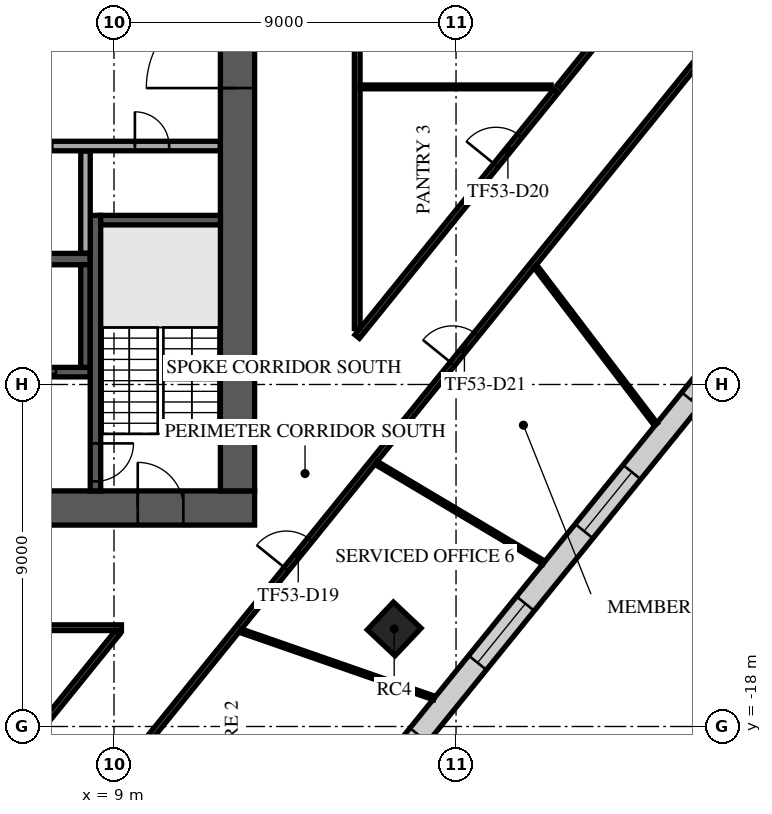
"""IFC4 building model, lengths in metres.
Left out: names, types, materials, properties, quantities, classifications, styles, units other than length and angle.
Written with IfcOpenShell. Run it as: python <this file> out.ifc"""

import sys

from ifc_helpers import new_model, si_unit, direction, frame, frame_2d, origin, origin_2d, place, context, subcontext, project, spatial, rectangle, extrude, element, fill, save


model = new_model("IFC4")
c1 = context("Model", 3, precision=1e-05, world=origin(), true_north=direction((0.0, 1.0)))
c2 = subcontext(c1, "Body", "Model", "MODEL_VIEW")
j1 = project(units=[si_unit("LENGTHUNIT", "METRE"), si_unit("PLANEANGLEUNIT", "RADIAN")], contexts=[c1])
p1 = place(None, origin())
s1 = spatial("IfcSite", under=j1, at=p1, CompositionType="ELEMENT")
p2 = place(p1, origin())
s2 = spatial("IfcBuilding", under=s1, at=p2, CompositionType="ELEMENT")
p3 = place(p2, frame((0.0, 0.0, 225.3)))
s3 = spatial("IfcBuildingStorey", under=s2, at=p3, CompositionType="ELEMENT", Elevation=225.3)
p4 = place(p3, frame((16.373, -15.433, 0.0), z_axis=(0.0, 0.0, 1.0), x_axis=(0.685916152371, 0.727680583715, 0.0)))
e1 = element("IfcColumn", 1, at=p4, inside=s3, PredefinedType="COLUMN", context=c2, shape_type="SweptSolid", body=[
    extrude(rectangle(XDim=1.0, YDim=1.0, at=origin_2d()), origin(), (0.0, 0.0, 1.0), 4.0),
])
p5 = place(p3, frame((-12.7, -12.25, 0.0), z_axis=(0.0, 0.0, 1.0), x_axis=(1.0, 0.0, 0.0)))
e2 = element("IfcWall", 2, at=p5, inside=s3, PredefinedType="SHEAR", context=c2, shape_type="SweptSolid", body=[
    extrude(rectangle(XDim=25.4, YDim=0.9, at=frame_2d((12.7, 0.0))), origin(), (0.0, 0.0, 1.0), 3.62),
])
p6 = place(p5, frame((7.6, 0.0, 0.0)))
e3 = element("IfcOpeningElement", 3, at=p6, cuts=e2, PredefinedType="OPENING", context=c2, shape_type="SweptSolid", body=[
    extrude(rectangle(XDim=2.0, YDim=2.1, at=frame_2d((1.0, 1.05))), frame((0.0, 0.46, 0.0), z_axis=(0.0, -1.0, 0.0), x_axis=(1.0, 0.0, 0.0)), (0.0, 0.0, 1.0), 0.92),
])
p7 = place(p5, frame((17.725, 0.0, 0.0)))
e4 = element("IfcOpeningElement", 4, at=p7, cuts=e2, PredefinedType="OPENING", context=c2, shape_type="SweptSolid", body=[
    extrude(rectangle(XDim=1.2, YDim=2.1, at=frame_2d((0.6, 1.05))), frame((0.0, 0.46, 0.0), z_axis=(0.0, -1.0, 0.0), x_axis=(1.0, 0.0, 0.0)), (0.0, 0.0, 1.0), 0.92),
])
p8 = place(p5, frame((1.875, 0.0, 0.0)))
e5 = element("IfcOpeningElement", 5, at=p8, cuts=e2, PredefinedType="OPENING", context=c2, shape_type="SweptSolid", body=[
    extrude(rectangle(XDim=1.2, YDim=2.1, at=frame_2d((0.6, 1.05))), frame((0.0, 0.46, 0.0), z_axis=(0.0, -1.0, 0.0), x_axis=(1.0, 0.0, 0.0)), (0.0, 0.0, 1.0), 0.92),
])
p9 = place(p5, frame((22.325, 0.0, 0.0)))
e6 = element("IfcOpeningElement", 6, at=p9, cuts=e2, PredefinedType="OPENING", context=c2, shape_type="SweptSolid", body=[
    extrude(rectangle(XDim=1.2, YDim=2.1, at=frame_2d((0.6, 1.05))), frame((0.0, 0.46, 0.0), z_axis=(0.0, -1.0, 0.0), x_axis=(1.0, 0.0, 0.0)), (0.0, 0.0, 1.0), 0.92),
])
p10 = place(p3, frame((12.25, -11.8, 0.0), z_axis=(0.0, 0.0, 1.0), x_axis=(0.0, 1.0, 0.0)))
e7 = element("IfcWall", 7, at=p10, inside=s3, PredefinedType="SHEAR", context=c2, shape_type="SweptSolid", body=[
    extrude(rectangle(XDim=23.6, YDim=0.9, at=frame_2d((11.8, 0.0))), origin(), (0.0, 0.0, 1.0), 3.62),
])
p11 = place(p10, frame((10.6, 0.0, 0.0)))
e8 = element("IfcOpeningElement", 8, at=p11, cuts=e7, PredefinedType="OPENING", context=c2, shape_type="SweptSolid", body=[
    extrude(rectangle(XDim=2.4, YDim=2.4, at=frame_2d((1.2, 1.2))), frame((0.0, 0.46, 0.0), z_axis=(0.0, -1.0, 0.0), x_axis=(1.0, 0.0, 0.0)), (0.0, 0.0, 1.0), 0.92),
])
p12 = place(p3, frame((-2.875, -5.7, 0.0), z_axis=(0.0, 0.0, 1.0), x_axis=(1.0, 0.0, 0.0)))
e9 = element("IfcWall", 9, at=p12, inside=s3, PredefinedType="SOLIDWALL", context=c2, shape_type="SweptSolid", body=[
    extrude(rectangle(XDim=11.25, YDim=0.3, at=frame_2d((5.625, 0.0))), origin(), (0.0, 0.0, 1.0), 3.62),
])
p13 = place(p3, frame((-2.875, -8.675, 0.0), z_axis=(0.0, 0.0, 1.0), x_axis=(1.0, 0.0, 0.0)))
e10 = element("IfcWall", 10, at=p13, inside=s3, PredefinedType="SOLIDWALL", context=c2, shape_type="SweptSolid", body=[
    extrude(rectangle(XDim=11.25, YDim=0.25, at=frame_2d((5.625, 0.0))), origin(), (0.0, 0.0, 1.0), 3.62),
])
p14 = place(p13, frame((0.9, 0.0, 0.0)))
e11 = element("IfcOpeningElement", 11, at=p14, cuts=e10, PredefinedType="OPENING", context=c2, shape_type="SweptSolid", body=[
    extrude(rectangle(XDim=1.2, YDim=2.1, at=frame_2d((0.6, 1.05))), frame((0.0, 0.135, 0.0), z_axis=(0.0, -1.0, 0.0), x_axis=(1.0, 0.0, 0.0)), (0.0, 0.0, 1.0), 0.27),
])
p15 = place(p13, frame((3.65, 0.0, 0.0)))
e12 = element("IfcOpeningElement", 12, at=p15, cuts=e10, PredefinedType="OPENING", context=c2, shape_type="SweptSolid", body=[
    extrude(rectangle(XDim=1.2, YDim=2.1, at=frame_2d((0.6, 1.05))), frame((0.0, 0.135, 0.0), z_axis=(0.0, -1.0, 0.0), x_axis=(1.0, 0.0, 0.0)), (0.0, 0.0, 1.0), 0.27),
])
p16 = place(p13, frame((6.4, 0.0, 0.0)))
e13 = element("IfcOpeningElement", 13, at=p16, cuts=e10, PredefinedType="OPENING", context=c2, shape_type="SweptSolid", body=[
    extrude(rectangle(XDim=1.2, YDim=2.1, at=frame_2d((0.6, 1.05))), frame((0.0, 0.135, 0.0), z_axis=(0.0, -1.0, 0.0), x_axis=(1.0, 0.0, 0.0)), (0.0, 0.0, 1.0), 0.27),
])
p17 = place(p13, frame((9.15, 0.0, 0.0)))
e14 = element("IfcOpeningElement", 14, at=p17, cuts=e10, PredefinedType="OPENING", context=c2, shape_type="SweptSolid", body=[
    extrude(rectangle(XDim=1.2, YDim=2.1, at=frame_2d((0.6, 1.05))), frame((0.0, 0.135, 0.0), z_axis=(0.0, -1.0, 0.0), x_axis=(1.0, 0.0, 0.0)), (0.0, 0.0, 1.0), 0.27),
])
p18 = place(p3, frame((8.25, -8.55, 0.0), z_axis=(0.0, 0.0, 1.0), x_axis=(0.0, 1.0, 0.0)))
e15 = element("IfcWall", 15, at=p18, inside=s3, PredefinedType="SOLIDWALL", context=c2, shape_type="SweptSolid", body=[
    extrude(rectangle(XDim=2.7, YDim=0.25, at=frame_2d((1.35, 0.0))), origin(), (0.0, 0.0, 1.0), 3.62),
])
p19 = place(p3, frame((8.512, -4.55, 0.0), z_axis=(0.0, 0.0, 1.0), x_axis=(0.0, -1.0, 0.0)))
e16 = element("IfcWall", 16, at=p19, inside=s3, PredefinedType="SOLIDWALL", context=c2, shape_type="SweptSolid", body=[
    extrude(rectangle(XDim=7.25, YDim=0.275, at=frame_2d((3.625, 0.0))), origin(), (0.0, 0.0, 1.0), 3.62),
])
p20 = place(p19, frame((6.0, 0.0, 0.0)))
e17 = element("IfcOpeningElement", 17, at=p20, cuts=e16, PredefinedType="OPENING", context=c2, shape_type="SweptSolid", body=[
    extrude(rectangle(XDim=1.0, YDim=2.1, at=frame_2d((0.5, 1.05))), frame((0.0, 0.147, 0.0), z_axis=(0.0, -1.0, 0.0), x_axis=(1.0, 0.0, 0.0)), (0.0, 0.0, 1.0), 0.295),
])
p21 = place(p3, frame((8.65, -4.675, 0.0), z_axis=(0.0, 0.0, 1.0), x_axis=(1.0, 0.0, 0.0)))
e18 = element("IfcWall", 18, at=p21, inside=s3, PredefinedType="SOLIDWALL", context=c2, shape_type="SweptSolid", body=[
    extrude(rectangle(XDim=3.15, YDim=0.25, at=frame_2d((1.575, 0.0))), origin(), (0.0, 0.0, 1.0), 3.62),
])
p22 = place(p3, frame((8.25, -5.545, 0.0), z_axis=(0.0, 0.0, 1.0), x_axis=(0.0, 1.0, 0.0)))
e19 = element("IfcWall", 19, at=p22, inside=s3, PredefinedType="PARTITIONING", context=c2, shape_type="SweptSolid", body=[
    extrude(rectangle(XDim=2.69, YDim=0.25, at=frame_2d((1.345, 0.0))), origin(), (0.0, 0.0, 1.0), 3.62),
])
p23 = place(p3, frame((5.63, -2.725, 0.0), z_axis=(0.0, 0.0, 1.0), x_axis=(1.0, 0.0, 0.0)))
e20 = element("IfcWall", 20, at=p23, inside=s3, PredefinedType="PARTITIONING", context=c2, shape_type="SweptSolid", body=[
    extrude(rectangle(XDim=6.165, YDim=0.25, at=frame_2d((3.083, 0.0))), origin(), (0.0, 0.0, 1.0), 3.62),
])
p24 = place(p23, frame((0.745, 0.0, 0.0)))
e21 = element("IfcOpeningElement", 21, at=p24, cuts=e20, PredefinedType="OPENING", context=c2, shape_type="SweptSolid", body=[
    extrude(rectangle(XDim=1.0, YDim=2.1, at=frame_2d((0.5, 1.05))), frame((0.0, 0.135, 0.0), z_axis=(0.0, -1.0, 0.0), x_axis=(1.0, 0.0, 0.0)), (0.0, 0.0, 1.0), 0.27),
])
p25 = place(p23, frame((3.92, 0.0, 0.0)))
e22 = element("IfcOpeningElement", 22, at=p25, cuts=e20, PredefinedType="OPENING", context=c2, shape_type="SweptSolid", body=[
    extrude(rectangle(XDim=0.9, YDim=2.1, at=frame_2d((0.45, 1.05))), frame((0.0, 0.135, 0.0), z_axis=(0.0, -1.0, 0.0), x_axis=(1.0, 0.0, 0.0)), (0.0, 0.0, 1.0), 0.27),
])
p26 = place(p3, frame((3.777, -34.584, 0.0), z_axis=(0.0, 0.0, 1.0), x_axis=(0.629323778295, 0.777143218508, 0.0)))
e23 = element("IfcWall", 23, at=p26, inside=s3, PredefinedType="STANDARD", context=c2, shape_type="SweptSolid", body=[
    extrude(rectangle(XDim=49.0, YDim=0.6, at=frame_2d((24.5, 0.0))), origin(), (0.0, 0.0, 1.0), 3.62),
])
p27 = place(p26, frame((1.227, 0.0, 0.9)))
e24 = element("IfcOpeningElement", 24, at=p27, cuts=e23, PredefinedType="OPENING", context=c2, shape_type="SweptSolid", body=[
    extrude(rectangle(XDim=2.0, YDim=2.1, at=frame_2d((1.0, 1.05))), frame((0.0, 0.31, 0.0), z_axis=(0.0, -1.0, 0.0), x_axis=(1.0, 0.0, 0.0)), (0.0, 0.0, 1.0), 0.62),
])
p28 = place(p26, frame((5.682, 0.0, 0.9)))
e25 = element("IfcOpeningElement", 25, at=p28, cuts=e23, PredefinedType="OPENING", context=c2, shape_type="SweptSolid", body=[
    extrude(rectangle(XDim=2.0, YDim=2.1, at=frame_2d((1.0, 1.05))), frame((0.0, 0.31, 0.0), z_axis=(0.0, -1.0, 0.0), x_axis=(1.0, 0.0, 0.0)), (0.0, 0.0, 1.0), 0.62),
])
p29 = place(p26, frame((10.136, 0.0, 0.9)))
e26 = element("IfcOpeningElement", 26, at=p29, cuts=e23, PredefinedType="OPENING", context=c2, shape_type="SweptSolid", body=[
    extrude(rectangle(XDim=2.0, YDim=2.1, at=frame_2d((1.0, 1.05))), frame((0.0, 0.31, 0.0), z_axis=(0.0, -1.0, 0.0), x_axis=(1.0, 0.0, 0.0)), (0.0, 0.0, 1.0), 0.62),
])
p30 = place(p26, frame((14.591, 0.0, 0.9)))
e27 = element("IfcOpeningElement", 27, at=p30, cuts=e23, PredefinedType="OPENING", context=c2, shape_type="SweptSolid", body=[
    extrude(rectangle(XDim=2.0, YDim=2.1, at=frame_2d((1.0, 1.05))), frame((0.0, 0.31, 0.0), z_axis=(0.0, -1.0, 0.0), x_axis=(1.0, 0.0, 0.0)), (0.0, 0.0, 1.0), 0.62),
])
p31 = place(p26, frame((19.045, 0.0, 0.9)))
e28 = element("IfcOpeningElement", 28, at=p31, cuts=e23, PredefinedType="OPENING", context=c2, shape_type="SweptSolid", body=[
    extrude(rectangle(XDim=2.0, YDim=2.1, at=frame_2d((1.0, 1.05))), frame((0.0, 0.31, 0.0), z_axis=(0.0, -1.0, 0.0), x_axis=(1.0, 0.0, 0.0)), (0.0, 0.0, 1.0), 0.62),
])
p32 = place(p26, frame((23.5, 0.0, 0.9)))
e29 = element("IfcOpeningElement", 29, at=p32, cuts=e23, PredefinedType="OPENING", context=c2, shape_type="SweptSolid", body=[
    extrude(rectangle(XDim=2.0, YDim=2.1, at=frame_2d((1.0, 1.05))), frame((0.0, 0.31, 0.0), z_axis=(0.0, -1.0, 0.0), x_axis=(1.0, 0.0, 0.0)), (0.0, 0.0, 1.0), 0.62),
])
p33 = place(p26, frame((27.955, 0.0, 0.9)))
e30 = element("IfcOpeningElement", 30, at=p33, cuts=e23, PredefinedType="OPENING", context=c2, shape_type="SweptSolid", body=[
    extrude(rectangle(XDim=2.0, YDim=2.1, at=frame_2d((1.0, 1.05))), frame((0.0, 0.31, 0.0), z_axis=(0.0, -1.0, 0.0), x_axis=(1.0, 0.0, 0.0)), (0.0, 0.0, 1.0), 0.62),
])
p34 = place(p26, frame((32.409, 0.0, 0.9)))
e31 = element("IfcOpeningElement", 31, at=p34, cuts=e23, PredefinedType="OPENING", context=c2, shape_type="SweptSolid", body=[
    extrude(rectangle(XDim=2.0, YDim=2.1, at=frame_2d((1.0, 1.05))), frame((0.0, 0.31, 0.0), z_axis=(0.0, -1.0, 0.0), x_axis=(1.0, 0.0, 0.0)), (0.0, 0.0, 1.0), 0.62),
])
p35 = place(p26, frame((36.864, 0.0, 0.9)))
e32 = element("IfcOpeningElement", 32, at=p35, cuts=e23, PredefinedType="OPENING", context=c2, shape_type="SweptSolid", body=[
    extrude(rectangle(XDim=2.0, YDim=2.1, at=frame_2d((1.0, 1.05))), frame((0.0, 0.31, 0.0), z_axis=(0.0, -1.0, 0.0), x_axis=(1.0, 0.0, 0.0)), (0.0, 0.0, 1.0), 0.62),
])
p36 = place(p26, frame((41.318, 0.0, 0.9)))
e33 = element("IfcOpeningElement", 33, at=p36, cuts=e23, PredefinedType="OPENING", context=c2, shape_type="SweptSolid", body=[
    extrude(rectangle(XDim=2.0, YDim=2.1, at=frame_2d((1.0, 1.05))), frame((0.0, 0.31, 0.0), z_axis=(0.0, -1.0, 0.0), x_axis=(1.0, 0.0, 0.0)), (0.0, 0.0, 1.0), 0.62),
])
p37 = place(p26, frame((45.773, 0.0, 0.9)))
e34 = element("IfcOpeningElement", 34, at=p37, cuts=e23, PredefinedType="OPENING", context=c2, shape_type="SweptSolid", body=[
    extrude(rectangle(XDim=2.0, YDim=2.1, at=frame_2d((1.0, 1.05))), frame((0.0, 0.31, 0.0), z_axis=(0.0, -1.0, 0.0), x_axis=(1.0, 0.0, 0.0)), (0.0, 0.0, 1.0), 0.62),
])
p38 = place(p3, frame((-12.293, -15.4, 0.0), z_axis=(0.0, 0.0, 1.0), x_axis=(1.0, 0.0, 0.0)))
e35 = element("IfcWall", 35, at=p38, inside=s3, PredefinedType="PARTITIONING", context=c2, shape_type="SweptSolid", body=[
    extrude(rectangle(XDim=21.489, YDim=0.15, at=frame_2d((10.745, 0.0))), origin(), (0.0, 0.0, 1.0), 3.17),
])
p39 = place(p38, frame((13.212, 0.0, 0.0)))
e36 = element("IfcOpeningElement", 36, at=p39, cuts=e35, PredefinedType="OPENING", context=c2, shape_type="SweptSolid", body=[
    extrude(rectangle(XDim=1.8, YDim=2.1, at=frame_2d((0.9, 1.05))), frame((0.0, 0.085, 0.0), z_axis=(0.0, -1.0, 0.0), x_axis=(1.0, 0.0, 0.0)), (0.0, 0.0, 1.0), 0.17),
])
p40 = place(p3, frame((1.268, -25.191, 0.0), z_axis=(0.0, 0.0, 1.0), x_axis=(0.629298143895, 0.777163976321, 0.0)))
e37 = element("IfcWall", 37, at=p40, inside=s3, PredefinedType="PARTITIONING", context=c2, shape_type="SweptSolid", body=[
    extrude(rectangle(XDim=12.441, YDim=0.15, at=frame_2d((6.22, 0.0))), origin(), (0.0, 0.0, 1.0), 3.17),
])
p41 = place(p40, frame((6.55, 0.0, 0.0)))
e38 = element("IfcOpeningElement", 38, at=p41, cuts=e37, PredefinedType="OPENING", context=c2, shape_type="SweptSolid", body=[
    extrude(rectangle(XDim=1.0, YDim=2.1, at=frame_2d((0.5, 1.05))), frame((0.0, 0.085, 0.0), z_axis=(0.0, -1.0, 0.0), x_axis=(1.0, 0.0, 0.0)), (0.0, 0.0, 1.0), 0.17),
])
p42 = place(p3, frame((3.18, -26.643, 0.0), z_axis=(0.0, 0.0, 1.0), x_axis=(0.629322822444, 0.777143992547, 0.0)))
e39 = element("IfcWall", 39, at=p42, inside=s3, PredefinedType="PARTITIONING", context=c2, shape_type="SweptSolid", body=[
    extrude(rectangle(XDim=37.483, YDim=0.15, at=frame_2d((18.741, 0.0))), origin(), (0.0, 0.0, 1.0), 3.17),
])
p43 = place(p42, frame((6.346, 0.0, 0.0)))
e40 = element("IfcOpeningElement", 40, at=p43, cuts=e39, PredefinedType="OPENING", context=c2, shape_type="SweptSolid", body=[
    extrude(rectangle(XDim=1.0, YDim=2.1, at=frame_2d((0.5, 1.05))), frame((0.0, 0.085, 0.0), z_axis=(0.0, -1.0, 0.0), x_axis=(1.0, 0.0, 0.0)), (0.0, 0.0, 1.0), 0.17),
])
p44 = place(p42, frame((16.452, 0.0, 0.0)))
e41 = element("IfcOpeningElement", 41, at=p44, cuts=e39, PredefinedType="OPENING", context=c2, shape_type="SweptSolid", body=[
    extrude(rectangle(XDim=1.0, YDim=2.1, at=frame_2d((0.5, 1.05))), frame((0.0, 0.085, 0.0), z_axis=(0.0, -1.0, 0.0), x_axis=(1.0, 0.0, 0.0)), (0.0, 0.0, 1.0), 0.17),
])
p45 = place(p42, frame((23.4, 0.0, 0.0)))
e42 = element("IfcOpeningElement", 42, at=p45, cuts=e39, PredefinedType="OPENING", context=c2, shape_type="SweptSolid", body=[
    extrude(rectangle(XDim=1.0, YDim=2.1, at=frame_2d((0.5, 1.05))), frame((0.0, 0.085, 0.0), z_axis=(0.0, -1.0, 0.0), x_axis=(1.0, 0.0, 0.0)), (0.0, 0.0, 1.0), 0.17),
])
p46 = place(p3, frame((15.4, -7.739, 0.0), z_axis=(0.0, 0.0, 1.0), x_axis=(0.629348532184, 0.777123172373, 0.0)))
e43 = element("IfcWall", 43, at=p46, inside=s3, PredefinedType="PARTITIONING", context=c2, shape_type="SweptSolid", body=[
    extrude(rectangle(XDim=8.317, YDim=0.15, at=frame_2d((4.158, 0.0))), origin(), (0.0, 0.0, 1.0), 3.17),
])
p47 = place(p46, frame((5.8, 0.0, 0.0)))
e44 = element("IfcOpeningElement", 44, at=p47, cuts=e43, PredefinedType="OPENING", context=c2, shape_type="SweptSolid", body=[
    extrude(rectangle(XDim=1.0, YDim=2.1, at=frame_2d((0.5, 1.05))), frame((0.0, 0.085, 0.0), z_axis=(0.0, -1.0, 0.0), x_axis=(1.0, 0.0, 0.0)), (0.0, 0.0, 1.0), 0.17),
])
p48 = place(p3, frame((15.4, -7.527, 0.0), z_axis=(0.0, 0.0, 1.0), x_axis=(0.0, 1.0, 0.0)))
e45 = element("IfcWall", 45, at=p48, inside=s3, PredefinedType="PARTITIONING", context=c2, shape_type="SweptSolid", body=[
    extrude(rectangle(XDim=20.152, YDim=0.15, at=frame_2d((10.076, 0.0))), origin(), (0.0, 0.0, 1.0), 3.17),
])
p49 = place(p48, frame((11.908, 0.0, 0.0)))
e46 = element("IfcOpeningElement", 46, at=p49, cuts=e45, PredefinedType="OPENING", context=c2, shape_type="SweptSolid", body=[
    extrude(rectangle(XDim=1.0, YDim=2.1, at=frame_2d((0.5, 1.05))), frame((0.0, 0.085, 0.0), z_axis=(0.0, -1.0, 0.0), x_axis=(1.0, 0.0, 0.0)), (0.0, 0.0, 1.0), 0.17),
])
p50 = place(p3, frame((20.721, -1.169, 0.0), z_axis=(0.0, 0.0, 1.0), x_axis=(0.629297540066, 0.777164465262, 0.0)))
e47 = element("IfcWall", 47, at=p50, inside=s3, PredefinedType="PARTITIONING", context=c2, shape_type="SweptSolid", body=[
    extrude(rectangle(XDim=6.647, YDim=0.15, at=frame_2d((3.324, 0.0))), origin(), (0.0, 0.0, 1.0), 3.17),
])
p51 = place(p3, frame((12.336, -15.482, 0.0), z_axis=(0.0, 0.0, 1.0), x_axis=(0.94462938415, -0.328139187845, 0.0)))
e48 = element("IfcWall", 48, at=p51, inside=s3, PredefinedType="PARTITIONING", context=c2, shape_type="SweptSolid", body=[
    extrude(rectangle(XDim=5.387, YDim=0.1, at=frame_2d((2.694, 0.0))), origin(), (0.0, 0.0, 1.0), 2.97),
])
p52 = place(p3, frame((15.475, -1.169, 0.0), z_axis=(0.0, 0.0, 1.0), x_axis=(1.0, 0.0, 0.0)))
e49 = element("IfcWall", 49, at=p52, inside=s3, PredefinedType="PARTITIONING", context=c2, shape_type="SweptSolid", body=[
    extrude(rectangle(XDim=5.027, YDim=0.1, at=frame_2d((2.513, 0.0))), origin(), (0.0, 0.0, 1.0), 3.17),
])
p53 = place(p3, frame((15.9, -11.064, 0.0), z_axis=(0.0, 0.0, 1.0), x_axis=(0.859280435997, -0.511504772522, 0.0)))
e50 = element("IfcWall", 50, at=p53, inside=s3, PredefinedType="PARTITIONING", context=c2, shape_type="SweptSolid", body=[
    extrude(rectangle(XDim=5.131, YDim=0.1, at=frame_2d((2.565, 0.0))), origin(), (0.0, 0.0, 1.0), 2.97),
])
p54 = place(p3, frame((20.093, -5.895, 0.0), z_axis=(0.0, 0.0, 1.0), x_axis=(0.605640268949, -0.795738565502, 0.0)))
e51 = element("IfcWall", 51, at=p54, inside=s3, PredefinedType="PARTITIONING", context=c2, shape_type="SweptSolid", body=[
    extrude(rectangle(XDim=5.222, YDim=0.1, at=frame_2d((2.611, 0.0))), origin(), (0.0, 0.0, 1.0), 2.97),
])
p55 = place(p9, origin())
e52 = element("IfcDoor", 52, at=p55, inside=s3, OperationType="SINGLE_SWING_LEFT", PredefinedType="DOOR", context=c2, shape_type="SweptSolid", body=[
    extrude(rectangle(XDim=1.2, YDim=2.1, at=frame_2d((0.6, 1.05))), frame((0.0, 0.025, 0.0), z_axis=(0.0, -1.0, 0.0), x_axis=(1.0, 0.0, 0.0)), (0.0, 0.0, 1.0), 0.05),
])
fill(e6, e52)
p56 = place(p11, origin())
e53 = element("IfcDoor", 53, at=p56, inside=s3, OperationType="SINGLE_SWING_LEFT", PredefinedType="DOOR", context=c2, shape_type="SweptSolid", body=[
    extrude(rectangle(XDim=2.4, YDim=2.4, at=frame_2d((1.2, 1.2))), frame((0.0, 0.025, 0.0), z_axis=(0.0, -1.0, 0.0), x_axis=(1.0, 0.0, 0.0)), (0.0, 0.0, 1.0), 0.05),
])
fill(e8, e53)
p57 = place(p17, origin())
e54 = element("IfcDoor", 54, at=p57, inside=s3, OperationType="DOUBLE_DOOR_SLIDING", PredefinedType="DOOR", context=c2, shape_type="SweptSolid", body=[
    extrude(rectangle(XDim=1.2, YDim=2.1, at=frame_2d((0.6, 1.05))), frame((0.0, 0.025, 0.0), z_axis=(0.0, -1.0, 0.0), x_axis=(1.0, 0.0, 0.0)), (0.0, 0.0, 1.0), 0.05),
])
fill(e14, e54)
p58 = place(p20, origin())
e55 = element("IfcDoor", 55, at=p58, inside=s3, OperationType="SINGLE_SWING_LEFT", PredefinedType="DOOR", context=c2, shape_type="SweptSolid", body=[
    extrude(rectangle(XDim=1.0, YDim=2.1, at=frame_2d((0.5, 1.05))), frame((0.0, 0.025, 0.0), z_axis=(0.0, -1.0, 0.0), x_axis=(1.0, 0.0, 0.0)), (0.0, 0.0, 1.0), 0.05),
])
fill(e17, e55)
p59 = place(p25, origin())
e56 = element("IfcDoor", 56, at=p59, inside=s3, OperationType="SINGLE_SWING_RIGHT", PredefinedType="DOOR", context=c2, shape_type="SweptSolid", body=[
    extrude(rectangle(XDim=0.9, YDim=2.1, at=frame_2d((0.45, 1.05))), frame((0.0, 0.025, 0.0), z_axis=(0.0, -1.0, 0.0), x_axis=(1.0, 0.0, 0.0)), (0.0, 0.0, 1.0), 0.05),
])
fill(e22, e56)
p60 = place(p32, origin())
e57 = element("IfcWindow", 57, at=p60, inside=s3, PartitioningType="SINGLE_PANEL", PredefinedType="WINDOW", context=c2, shape_type="SweptSolid", body=[
    extrude(rectangle(XDim=2.0, YDim=2.1, at=frame_2d((1.0, 1.05))), frame((0.0, 0.03, 0.0), z_axis=(0.0, -1.0, 0.0), x_axis=(1.0, 0.0, 0.0)), (0.0, 0.0, 1.0), 0.06),
])
fill(e29, e57)
p61 = place(p33, origin())
e58 = element("IfcWindow", 58, at=p61, inside=s3, PartitioningType="SINGLE_PANEL", PredefinedType="WINDOW", context=c2, shape_type="SweptSolid", body=[
    extrude(rectangle(XDim=2.0, YDim=2.1, at=frame_2d((1.0, 1.05))), frame((0.0, 0.03, 0.0), z_axis=(0.0, -1.0, 0.0), x_axis=(1.0, 0.0, 0.0)), (0.0, 0.0, 1.0), 0.06),
])
fill(e30, e58)
p62 = place(p34, origin())
e59 = element("IfcWindow", 59, at=p62, inside=s3, PartitioningType="SINGLE_PANEL", PredefinedType="WINDOW", context=c2, shape_type="SweptSolid", body=[
    extrude(rectangle(XDim=2.0, YDim=2.1, at=frame_2d((1.0, 1.05))), frame((0.0, 0.03, 0.0), z_axis=(0.0, -1.0, 0.0), x_axis=(1.0, 0.0, 0.0)), (0.0, 0.0, 1.0), 0.06),
])
fill(e31, e59)
p63 = place(p44, frame((1.0, 0.0, 0.0), z_axis=(0.0, 0.0, 1.0), x_axis=(-1.0, 0.0, 0.0)))
e60 = element("IfcDoor", 60, at=p63, inside=s3, OperationType="SINGLE_SWING_RIGHT", PredefinedType="DOOR", context=c2, shape_type="SweptSolid", body=[
    extrude(rectangle(XDim=1.0, YDim=2.1, at=frame_2d((0.5, 1.05))), frame((0.0, 0.025, 0.0), z_axis=(0.0, -1.0, 0.0), x_axis=(1.0, 0.0, 0.0)), (0.0, 0.0, 1.0), 0.05),
])
fill(e41, e60)
p64 = place(p47, origin())
e61 = element("IfcDoor", 61, at=p64, inside=s3, OperationType="SINGLE_SWING_RIGHT", PredefinedType="DOOR", context=c2, shape_type="SweptSolid", body=[
    extrude(rectangle(XDim=1.0, YDim=2.1, at=frame_2d((0.5, 1.05))), frame((0.0, 0.025, 0.0), z_axis=(0.0, -1.0, 0.0), x_axis=(1.0, 0.0, 0.0)), (0.0, 0.0, 1.0), 0.05),
])
fill(e44, e61)
p65 = place(p45, frame((1.0, 0.0, 0.0), z_axis=(0.0, 0.0, 1.0), x_axis=(-1.0, 0.0, 0.0)))
e62 = element("IfcDoor", 62, at=p65, inside=s3, OperationType="SINGLE_SWING_LEFT", PredefinedType="DOOR", context=c2, shape_type="SweptSolid", body=[
    extrude(rectangle(XDim=1.0, YDim=2.1, at=frame_2d((0.5, 1.05))), frame((0.0, 0.025, 0.0), z_axis=(0.0, -1.0, 0.0), x_axis=(1.0, 0.0, 0.0)), (0.0, 0.0, 1.0), 0.05),
])
fill(e42, e62)
save(model, sys.argv[1])
